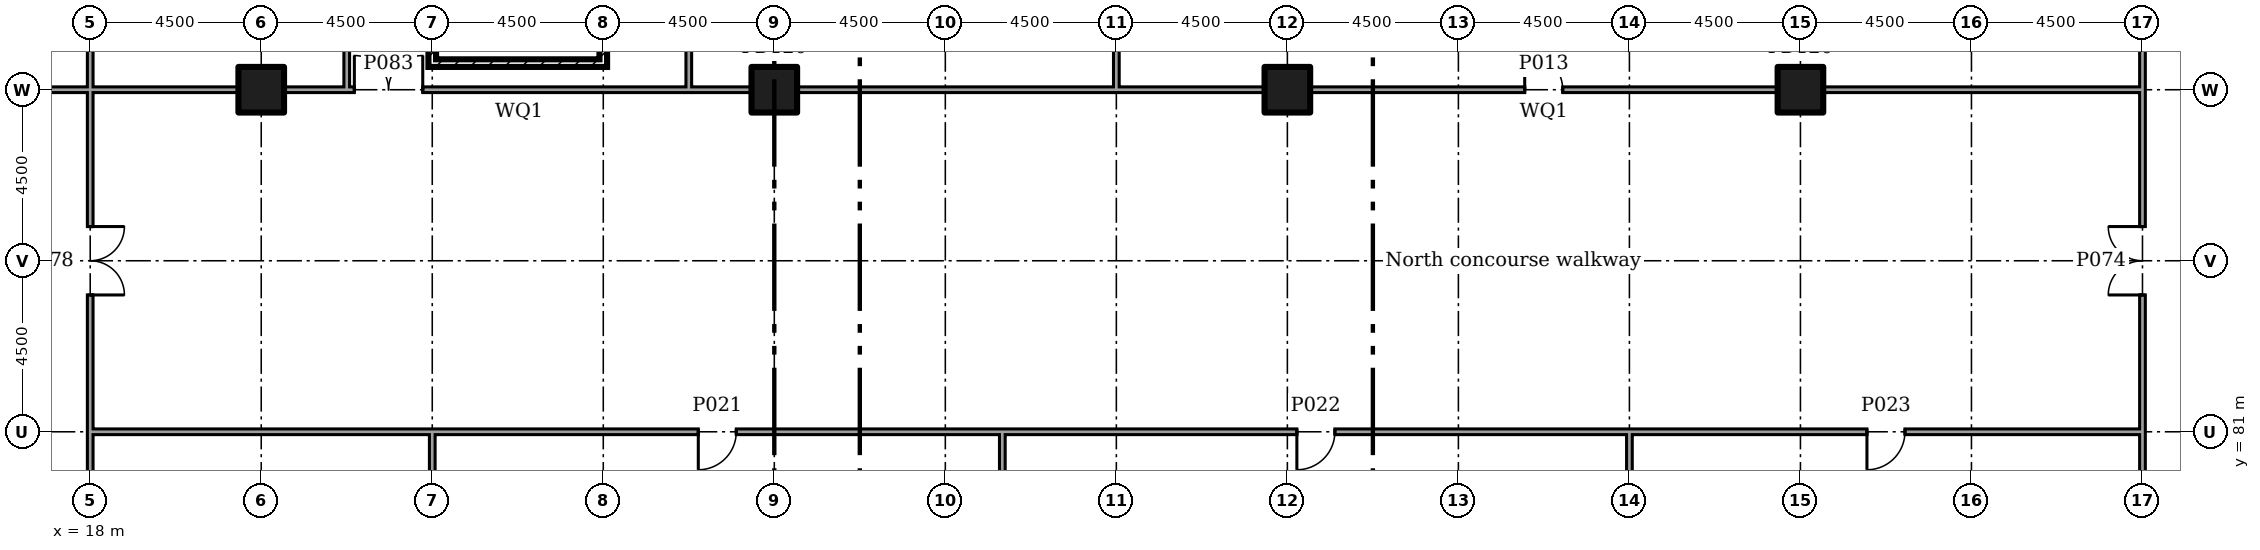
"""IFC4 building model, lengths in metres.
Left out: names, types, materials, properties, quantities, classifications, styles, units other than length and angle.
Written with IfcOpenShell. Run it as: python <this file> out.ifc"""

import sys

from ifc_helpers import new_model, si_unit, direction, frame, frame_2d, origin, origin_2d, place, context, subcontext, project, spatial, rectangle, extrude, element, fill, save


model = new_model("IFC4")
c1 = context("Model", 3, precision=1e-05, world=origin(), true_north=direction((0.0, 1.0)))
c2 = subcontext(c1, "Body", "Model", "MODEL_VIEW")
j1 = project(units=[si_unit("LENGTHUNIT", "METRE"), si_unit("PLANEANGLEUNIT", "RADIAN")], contexts=[c1])
p1 = place(None, origin())
s1 = spatial("IfcSite", under=j1, at=p1, CompositionType="ELEMENT")
p2 = place(p1, origin())
s2 = spatial("IfcBuilding", under=s1, at=p2, CompositionType="ELEMENT")
p3 = place(p2, origin())
s3 = spatial("IfcBuildingStorey", under=s2, at=p3, CompositionType="ELEMENT", Elevation=0.0)
for number, where in (
    (1, (22.5, 90.0, 0.0)),
    (2, (36.0, 90.0, 0.0)),
    (3, (49.5, 90.0, 0.0)),
    (4, (63.0, 90.0, 0.0)),
):
    element("IfcColumn", number, at=place(p3, frame(where)), inside=s3, PredefinedType="COLUMN", context=c2, shape_type="SweptSolid", body=[
        extrude(rectangle(XDim=1.2, YDim=1.2, at=origin_2d()), origin(), (0.0, 0.0, 1.0), 6.0),
    ])
p4 = place(p3, frame((72.0, 80.925, 0.0), z_axis=(0.0, 0.0, 1.0), x_axis=(0.0, 1.0, 0.0)))
e5 = element("IfcWall", 5, at=p4, inside=s3, PredefinedType="PARTITIONING", context=c2, shape_type="SweptSolid", body=[
    extrude(rectangle(XDim=9.15, YDim=0.15, at=frame_2d((4.575, 0.0))), origin(), (0.0, 0.0, 1.0), 5.55),
])
p5 = place(p4, frame((3.675, 0.0, 0.0)))
e6 = element("IfcOpeningElement", 6, at=p5, cuts=e5, PredefinedType="OPENING", context=c2, shape_type="SweptSolid", body=[
    extrude(rectangle(XDim=1.8, YDim=2.1, at=frame_2d((0.9, 1.05))), frame((0.0, 0.085, 0.0), z_axis=(0.0, -1.0, 0.0), x_axis=(1.0, 0.0, 0.0)), (0.0, 0.0, 1.0), 0.17),
])
p6 = place(p3, frame((72.0, 90.0, 0.0), z_axis=(0.0, 0.0, 1.0), x_axis=(0.0, 1.0, 0.0)))
e7 = element("IfcWall", 7, at=p6, inside=s3, PredefinedType="PARTITIONING", context=c2, shape_type="SweptSolid", body=[
    extrude(rectangle(XDim=8.7, YDim=0.15, at=frame_2d((4.35, 0.0))), origin(), (0.0, 0.0, 1.0), 5.55),
])
p7 = place(p3, frame((72.0, 76.5, 0.0), z_axis=(0.0, 0.0, 1.0), x_axis=(0.0, 1.0, 0.0)))
e8 = element("IfcWall", 8, at=p7, inside=s3, PredefinedType="PARTITIONING", context=c2, shape_type="SweptSolid", body=[
    extrude(rectangle(XDim=4.5, YDim=0.15, at=frame_2d((2.25, 0.0))), origin(), (0.0, 0.0, 1.0), 5.55),
])
p8 = place(p3, frame((18.0, 80.925, 0.0), z_axis=(0.0, 0.0, 1.0), x_axis=(0.0, 1.0, 0.0)))
e9 = element("IfcWall", 9, at=p8, inside=s3, PredefinedType="PARTITIONING", context=c2, shape_type="SweptSolid", body=[
    extrude(rectangle(XDim=9.15, YDim=0.15, at=frame_2d((4.575, 0.0))), origin(), (0.0, 0.0, 1.0), 5.55),
])
p9 = place(p8, frame((3.675, 0.0, 0.0)))
e10 = element("IfcOpeningElement", 10, at=p9, cuts=e9, PredefinedType="OPENING", context=c2, shape_type="SweptSolid", body=[
    extrude(rectangle(XDim=1.8, YDim=2.1, at=frame_2d((0.9, 1.05))), frame((0.0, 0.085, 0.0), z_axis=(0.0, -1.0, 0.0), x_axis=(1.0, 0.0, 0.0)), (0.0, 0.0, 1.0), 0.17),
])
p10 = place(p3, frame((9.595, 90.0, 0.0)))
e11 = element("IfcWall", 11, at=p10, inside=s3, PredefinedType="PARTITIONING", context=c2, shape_type="SweptSolid", body=[
    extrude(rectangle(XDim=8.48, YDim=0.15, at=frame_2d((4.24, 0.0))), origin(), (0.0, 0.0, 1.0), 5.55),
])
p11 = place(p10, frame((3.7, 0.0, 0.0)))
e12 = element("IfcOpeningElement", 12, at=p11, cuts=e11, PredefinedType="OPENING", context=c2, shape_type="SweptSolid", body=[
    extrude(rectangle(XDim=1.0, YDim=2.1, at=frame_2d((0.5, 1.05))), frame((0.0, 0.085, 0.0), z_axis=(0.0, -1.0, 0.0), x_axis=(1.0, 0.0, 0.0)), (0.0, 0.0, 1.0), 0.17),
])
p12 = place(p3, frame((18.0, 63.0, 0.0), z_axis=(0.0, 0.0, 1.0), x_axis=(0.0, 1.0, 0.0)))
e13 = element("IfcWall", 13, at=p12, inside=s3, PredefinedType="PARTITIONING", context=c2, shape_type="SweptSolid", body=[
    extrude(rectangle(XDim=18.0, YDim=0.15, at=frame_2d((9.0, 0.0))), origin(), (0.0, 0.0, 1.0), 5.55),
])
p13 = place(p12, frame((8.5, 0.0, 0.0)))
e14 = element("IfcOpeningElement", 14, at=p13, cuts=e13, PredefinedType="OPENING", context=c2, shape_type="SweptSolid", body=[
    extrude(rectangle(XDim=1.0, YDim=2.1, at=frame_2d((0.5, 1.05))), frame((0.0, 0.085, 0.0), z_axis=(0.0, -1.0, 0.0), x_axis=(1.0, 0.0, 0.0)), (0.0, 0.0, 1.0), 0.17),
])
p14 = place(p3, frame((18.075, 90.0, 0.0)))
e15 = element("IfcWall", 15, at=p14, inside=s3, PredefinedType="PARTITIONING", context=c2, shape_type="SweptSolid", body=[
    extrude(rectangle(XDim=3.83, YDim=0.15, at=frame_2d((1.915, 0.0))), origin(), (0.0, 0.0, 1.0), 5.55),
])
p15 = place(p3, frame((23.095, 90.0, 0.0)))
e16 = element("IfcWall", 16, at=p15, inside=s3, PredefinedType="PARTITIONING", context=c2, shape_type="SweptSolid", body=[
    extrude(rectangle(XDim=1.73, YDim=0.15, at=frame_2d((0.865, 0.0))), origin(), (0.0, 0.0, 1.0), 5.55),
])
p16 = place(p3, frame((24.75, 90.0, 0.0)))
e17 = element("IfcWall", 17, at=p16, inside=s3, PredefinedType="PARTITIONING", context=c2, shape_type="SweptSolid", body=[
    extrude(rectangle(XDim=9.075, YDim=0.15, at=frame_2d((4.538, 0.0))), origin(), (0.0, 0.0, 1.0), 5.55),
])
p17 = place(p16, frame((0.2, 0.0, 0.0)))
e18 = element("IfcOpeningElement", 18, at=p17, cuts=e17, PredefinedType="OPENING", context=c2, shape_type="SweptSolid", body=[
    extrude(rectangle(XDim=1.8, YDim=2.1, at=frame_2d((0.9, 1.05))), frame((0.0, 0.085, 0.0), z_axis=(0.0, -1.0, 0.0), x_axis=(1.0, 0.0, 0.0)), (0.0, 0.0, 1.0), 0.17),
])
p18 = place(p3, frame((33.75, 90.0, 0.0)))
e19 = element("IfcWall", 19, at=p18, inside=s3, PredefinedType="PARTITIONING", context=c2, shape_type="SweptSolid", body=[
    extrude(rectangle(XDim=1.655, YDim=0.15, at=frame_2d((0.828, 0.0))), origin(), (0.0, 0.0, 1.0), 5.55),
])
p19 = place(p3, frame((36.595, 90.0, 0.0)))
e20 = element("IfcWall", 20, at=p19, inside=s3, PredefinedType="PARTITIONING", context=c2, shape_type="SweptSolid", body=[
    extrude(rectangle(XDim=8.48, YDim=0.15, at=frame_2d((4.24, 0.0))), origin(), (0.0, 0.0, 1.0), 5.55),
])
p20 = place(p3, frame((45.0, 90.0, 0.0)))
e21 = element("IfcWall", 21, at=p20, inside=s3, PredefinedType="PARTITIONING", context=c2, shape_type="SweptSolid", body=[
    extrude(rectangle(XDim=3.905, YDim=0.15, at=frame_2d((1.953, 0.0))), origin(), (0.0, 0.0, 1.0), 5.55),
])
p21 = place(p3, frame((50.095, 90.0, 0.0)))
e22 = element("IfcWall", 22, at=p21, inside=s3, PredefinedType="PARTITIONING", context=c2, shape_type="SweptSolid", body=[
    extrude(rectangle(XDim=12.31, YDim=0.15, at=frame_2d((6.155, 0.0))), origin(), (0.0, 0.0, 1.0), 5.55),
])
p22 = place(p21, frame((5.65, 0.0, 0.0)))
e23 = element("IfcOpeningElement", 23, at=p22, cuts=e22, PredefinedType="OPENING", context=c2, shape_type="SweptSolid", body=[
    extrude(rectangle(XDim=1.0, YDim=2.1, at=frame_2d((0.5, 1.05))), frame((0.0, 0.085, 0.0), z_axis=(0.0, -1.0, 0.0), x_axis=(1.0, 0.0, 0.0)), (0.0, 0.0, 1.0), 0.17),
])
p23 = place(p3, frame((63.595, 90.0, 0.0)))
e24 = element("IfcWall", 24, at=p23, inside=s3, PredefinedType="PARTITIONING", context=c2, shape_type="SweptSolid", body=[
    extrude(rectangle(XDim=8.33, YDim=0.15, at=frame_2d((4.165, 0.0))), origin(), (0.0, 0.0, 1.0), 5.55),
])
p24 = place(p3, frame((18.075, 81.0, 0.0)))
e25 = element("IfcWall", 25, at=p24, inside=s3, PredefinedType="PARTITIONING", context=c2, shape_type="SweptSolid", body=[
    extrude(rectangle(XDim=9.0, YDim=0.15, at=frame_2d((4.5, 0.0))), origin(), (0.0, 0.0, 1.0), 5.55),
])
p25 = place(p3, frame((27.0, 81.0, 0.0)))
e26 = element("IfcWall", 26, at=p25, inside=s3, PredefinedType="PARTITIONING", context=c2, shape_type="SweptSolid", body=[
    extrude(rectangle(XDim=15.075, YDim=0.15, at=frame_2d((7.538, 0.0))), origin(), (0.0, 0.0, 1.0), 5.55),
])
p26 = place(p25, frame((7.0, 0.0, 0.0)))
e27 = element("IfcOpeningElement", 27, at=p26, cuts=e26, PredefinedType="OPENING", context=c2, shape_type="SweptSolid", body=[
    extrude(rectangle(XDim=1.0, YDim=2.1, at=frame_2d((0.5, 1.05))), frame((0.0, 0.085, 0.0), z_axis=(0.0, -1.0, 0.0), x_axis=(1.0, 0.0, 0.0)), (0.0, 0.0, 1.0), 0.17),
])
p27 = place(p3, frame((42.0, 81.0, 0.0)))
e28 = element("IfcWall", 28, at=p27, inside=s3, PredefinedType="PARTITIONING", context=c2, shape_type="SweptSolid", body=[
    extrude(rectangle(XDim=16.575, YDim=0.15, at=frame_2d((8.288, 0.0))), origin(), (0.0, 0.0, 1.0), 5.55),
])
p28 = place(p27, frame((7.75, 0.0, 0.0)))
e29 = element("IfcOpeningElement", 29, at=p28, cuts=e28, PredefinedType="OPENING", context=c2, shape_type="SweptSolid", body=[
    extrude(rectangle(XDim=1.0, YDim=2.1, at=frame_2d((0.5, 1.05))), frame((0.0, 0.085, 0.0), z_axis=(0.0, -1.0, 0.0), x_axis=(1.0, 0.0, 0.0)), (0.0, 0.0, 1.0), 0.17),
])
p29 = place(p3, frame((58.5, 81.0, 0.0)))
e30 = element("IfcWall", 30, at=p29, inside=s3, PredefinedType="PARTITIONING", context=c2, shape_type="SweptSolid", body=[
    extrude(rectangle(XDim=13.425, YDim=0.15, at=frame_2d((6.712, 0.0))), origin(), (0.0, 0.0, 1.0), 5.55),
])
p30 = place(p29, frame((6.25, 0.0, 0.0)))
e31 = element("IfcOpeningElement", 31, at=p30, cuts=e30, PredefinedType="OPENING", context=c2, shape_type="SweptSolid", body=[
    extrude(rectangle(XDim=1.0, YDim=2.1, at=frame_2d((0.5, 1.05))), frame((0.0, 0.085, 0.0), z_axis=(0.0, -1.0, 0.0), x_axis=(1.0, 0.0, 0.0)), (0.0, 0.0, 1.0), 0.17),
])
p31 = place(p3, frame((18.0, 90.075, 0.0), z_axis=(0.0, 0.0, 1.0), x_axis=(0.0, 1.0, 0.0)))
e32 = element("IfcWall", 32, at=p31, inside=s3, PredefinedType="PARTITIONING", context=c2, shape_type="SweptSolid", body=[
    extrude(rectangle(XDim=8.625, YDim=0.15, at=frame_2d((4.312, 0.0))), origin(), (0.0, 0.0, 1.0), 5.55),
])
p32 = place(p3, frame((24.75, 90.075, 0.0), z_axis=(0.0, 0.0, 1.0), x_axis=(0.0, 1.0, 0.0)))
e33 = element("IfcWall", 33, at=p32, inside=s3, PredefinedType="PARTITIONING", context=c2, shape_type="SweptSolid", body=[
    extrude(rectangle(XDim=8.625, YDim=0.15, at=frame_2d((4.312, 0.0))), origin(), (0.0, 0.0, 1.0), 5.55),
])
p33 = place(p32, frame((3.775, 0.0, 0.0)))
e34 = element("IfcOpeningElement", 34, at=p33, cuts=e33, PredefinedType="OPENING", context=c2, shape_type="SweptSolid", body=[
    extrude(rectangle(XDim=1.0, YDim=2.1, at=frame_2d((0.5, 1.05))), frame((0.0, 0.085, 0.0), z_axis=(0.0, -1.0, 0.0), x_axis=(1.0, 0.0, 0.0)), (0.0, 0.0, 1.0), 0.17),
])
p34 = place(p3, frame((33.75, 90.075, 0.0), z_axis=(0.0, 0.0, 1.0), x_axis=(0.0, 1.0, 0.0)))
e35 = element("IfcWall", 35, at=p34, inside=s3, PredefinedType="PARTITIONING", context=c2, shape_type="SweptSolid", body=[
    extrude(rectangle(XDim=8.625, YDim=0.15, at=frame_2d((4.312, 0.0))), origin(), (0.0, 0.0, 1.0), 5.55),
])
p35 = place(p34, frame((3.775, 0.0, 0.0)))
e36 = element("IfcOpeningElement", 36, at=p35, cuts=e35, PredefinedType="OPENING", context=c2, shape_type="SweptSolid", body=[
    extrude(rectangle(XDim=1.0, YDim=2.1, at=frame_2d((0.5, 1.05))), frame((0.0, 0.085, 0.0), z_axis=(0.0, -1.0, 0.0), x_axis=(1.0, 0.0, 0.0)), (0.0, 0.0, 1.0), 0.17),
])
p36 = place(p3, frame((27.0, 90.6, 0.0), z_axis=(0.0, 0.0, 1.0), x_axis=(0.0, 1.0, 0.0)))
e37 = element("IfcWall", 37, at=p36, inside=s3, PredefinedType="SOLIDWALL", context=c2, shape_type="SweptSolid", body=[
    extrude(rectangle(XDim=8.1, YDim=0.2, at=frame_2d((4.05, 0.0))), origin(), (0.0, 0.0, 1.0), 5.55),
])
p37 = place(p36, frame((6.4, 0.0, 0.0)))
e38 = element("IfcOpeningElement", 38, at=p37, cuts=e37, PredefinedType="OPENING", context=c2, shape_type="SweptSolid", body=[
    extrude(rectangle(XDim=1.1, YDim=2.1, at=frame_2d((0.55, 1.05))), frame((0.0, 0.11, 0.0), z_axis=(0.0, -1.0, 0.0), x_axis=(1.0, 0.0, 0.0)), (0.0, 0.0, 1.0), 0.22),
])
p38 = place(p3, frame((31.5, 90.6, 0.0), z_axis=(0.0, 0.0, 1.0), x_axis=(0.0, 1.0, 0.0)))
e39 = element("IfcWall", 39, at=p38, inside=s3, PredefinedType="SOLIDWALL", context=c2, shape_type="SweptSolid", body=[
    extrude(rectangle(XDim=8.1, YDim=0.2, at=frame_2d((4.05, 0.0))), origin(), (0.0, 0.0, 1.0), 5.55),
])
p39 = place(p3, frame((27.1, 90.7, 0.0)))
e40 = element("IfcWall", 40, at=p39, inside=s3, PredefinedType="SOLIDWALL", context=c2, shape_type="SweptSolid", body=[
    extrude(rectangle(XDim=4.3, YDim=0.2, at=frame_2d((2.15, 0.0))), origin(), (0.0, 0.0, 1.0), 5.55),
])
p40 = place(p3, frame((45.0, 90.075, 0.0), z_axis=(0.0, 0.0, 1.0), x_axis=(0.0, 1.0, 0.0)))
e41 = element("IfcWall", 41, at=p40, inside=s3, PredefinedType="PARTITIONING", context=c2, shape_type="SweptSolid", body=[
    extrude(rectangle(XDim=8.625, YDim=0.15, at=frame_2d((4.312, 0.0))), origin(), (0.0, 0.0, 1.0), 5.55),
])
for number, where, z_axis, x_axis in (
    (42, (27.0, 71.925, 0.0), (0.0, 0.0, 1.0), (0.0, 1.0, 0.0)),
    (43, (42.0, 71.925, 0.0), (0.0, 0.0, 1.0), (0.0, 1.0, 0.0)),
):
    element("IfcWall", number, at=place(p3, frame(where, z_axis=z_axis, x_axis=x_axis)), inside=s3, PredefinedType="PARTITIONING", context=c2, shape_type="SweptSolid", body=[
        extrude(rectangle(XDim=9.0, YDim=0.15, at=frame_2d((4.5, 0.0))), origin(), (0.0, 0.0, 1.0), 5.55),
    ])
p41 = place(p3, frame((58.5, 73.295, 0.0), z_axis=(0.0, 0.0, 1.0), x_axis=(0.0, 1.0, 0.0)))
e44 = element("IfcWall", 44, at=p41, inside=s3, PredefinedType="PARTITIONING", context=c2, shape_type="SweptSolid", body=[
    extrude(rectangle(XDim=7.63, YDim=0.15, at=frame_2d((3.815, 0.0))), origin(), (0.0, 0.0, 1.0), 5.55),
])
p42 = place(p22, origin())
e45 = element("IfcDoor", 45, at=p42, inside=s3, OperationType="SINGLE_SWING_RIGHT", PredefinedType="DOOR", context=c2, shape_type="SweptSolid", body=[
    extrude(rectangle(XDim=1.0, YDim=2.1, at=frame_2d((0.5, 1.05))), frame((0.0, 0.025, 0.0), z_axis=(0.0, -1.0, 0.0), x_axis=(1.0, 0.0, 0.0)), (0.0, 0.0, 1.0), 0.05),
])
fill(e23, e45)
p43 = place(p26, frame((1.0, 0.0, 0.0), x_axis=(-1.0, 0.0, 0.0)))
e46 = element("IfcDoor", 46, at=p43, inside=s3, OperationType="SINGLE_SWING_LEFT", PredefinedType="DOOR", context=c2, shape_type="SweptSolid", body=[
    extrude(rectangle(XDim=1.0, YDim=2.1, at=frame_2d((0.5, 1.05))), frame((0.0, 0.025, 0.0), z_axis=(0.0, -1.0, 0.0), x_axis=(1.0, 0.0, 0.0)), (0.0, 0.0, 1.0), 0.05),
])
fill(e27, e46)
p44 = place(p28, frame((1.0, 0.0, 0.0), x_axis=(-1.0, 0.0, 0.0)))
e47 = element("IfcDoor", 47, at=p44, inside=s3, OperationType="SINGLE_SWING_LEFT", PredefinedType="DOOR", context=c2, shape_type="SweptSolid", body=[
    extrude(rectangle(XDim=1.0, YDim=2.1, at=frame_2d((0.5, 1.05))), frame((0.0, 0.025, 0.0), z_axis=(0.0, -1.0, 0.0), x_axis=(1.0, 0.0, 0.0)), (0.0, 0.0, 1.0), 0.05),
])
fill(e29, e47)
p45 = place(p30, frame((1.0, 0.0, 0.0), x_axis=(-1.0, 0.0, 0.0)))
e48 = element("IfcDoor", 48, at=p45, inside=s3, OperationType="SINGLE_SWING_LEFT", PredefinedType="DOOR", context=c2, shape_type="SweptSolid", body=[
    extrude(rectangle(XDim=1.0, YDim=2.1, at=frame_2d((0.5, 1.05))), frame((0.0, 0.025, 0.0), z_axis=(0.0, -1.0, 0.0), x_axis=(1.0, 0.0, 0.0)), (0.0, 0.0, 1.0), 0.05),
])
fill(e31, e48)
p46 = place(p5, origin())
e49 = element("IfcDoor", 49, at=p46, inside=s3, OperationType="DOUBLE_DOOR_SINGLE_SWING", PredefinedType="DOOR", context=c2, shape_type="SweptSolid", body=[
    extrude(rectangle(XDim=1.8, YDim=2.1, at=frame_2d((0.9, 1.05))), frame((0.0, 0.025, 0.0), z_axis=(0.0, -1.0, 0.0), x_axis=(1.0, 0.0, 0.0)), (0.0, 0.0, 1.0), 0.05),
])
fill(e6, e49)
p47 = place(p9, frame((1.8, 0.0, 0.0), x_axis=(-1.0, 0.0, 0.0)))
e50 = element("IfcDoor", 50, at=p47, inside=s3, OperationType="DOUBLE_DOOR_SINGLE_SWING", PredefinedType="DOOR", context=c2, shape_type="SweptSolid", body=[
    extrude(rectangle(XDim=1.8, YDim=2.1, at=frame_2d((0.9, 1.05))), frame((0.0, 0.025, 0.0), z_axis=(0.0, -1.0, 0.0), x_axis=(1.0, 0.0, 0.0)), (0.0, 0.0, 1.0), 0.05),
])
fill(e10, e50)
p48 = place(p17, origin())
e51 = element("IfcDoor", 51, at=p48, inside=s3, OperationType="DOUBLE_DOOR_SINGLE_SWING", PredefinedType="DOOR", context=c2, shape_type="SweptSolid", body=[
    extrude(rectangle(XDim=1.8, YDim=2.1, at=frame_2d((0.9, 1.05))), frame((0.0, 0.025, 0.0), z_axis=(0.0, -1.0, 0.0), x_axis=(1.0, 0.0, 0.0)), (0.0, 0.0, 1.0), 0.05),
])
fill(e18, e51)
save(model, sys.argv[1])
